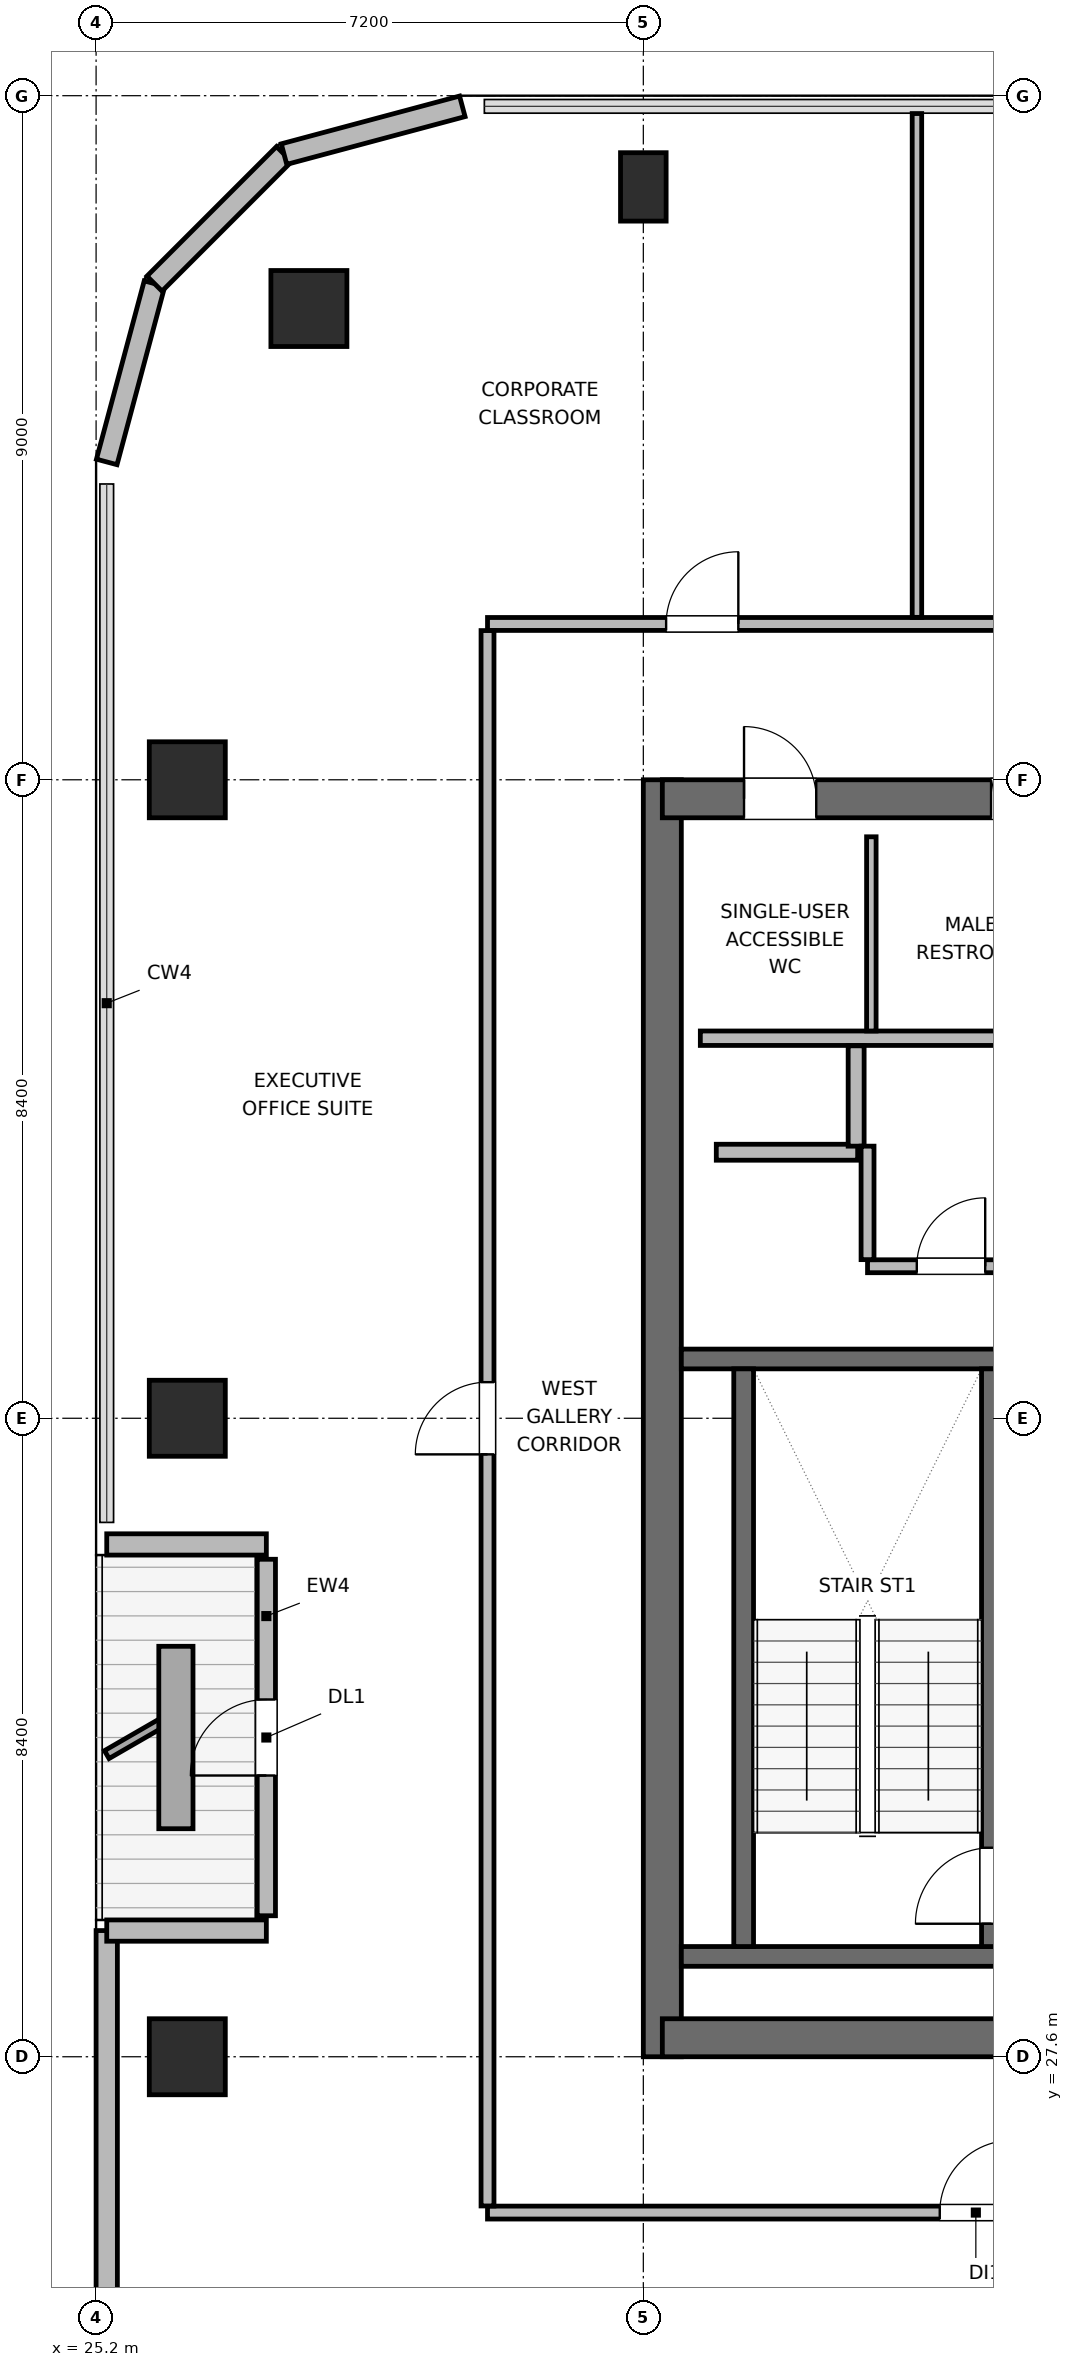
"""IFC4 building model, lengths in metres.
Left out: names, types, materials, properties, quantities, classifications, styles, units other than length and angle.
Written with IfcOpenShell. Run it as: python <this file> out.ifc"""

import sys

from ifc_helpers import new_model, si_unit, direction, frame, frame_2d, origin, origin_2d, place, context, subcontext, project, spatial, rectangle, circle, extrude, element, fill, save


model = new_model("IFC4")
c1 = context("Model", 3, precision=1e-05, world=origin(), true_north=direction((0.0, 1.0)))
c2 = subcontext(c1, "Body", "Model", "MODEL_VIEW")
j1 = project(units=[si_unit("LENGTHUNIT", "METRE"), si_unit("PLANEANGLEUNIT", "RADIAN")], contexts=[c1])
p1 = place(None, origin())
s1 = spatial("IfcSite", under=j1, at=p1, CompositionType="ELEMENT")
p2 = place(p1, origin())
s2 = spatial("IfcBuilding", under=s1, at=p2, CompositionType="ELEMENT")
p3 = place(p2, frame((0.0, 0.0, 274.5)))
s3 = spatial("IfcBuildingStorey", under=s2, at=p3, CompositionType="ELEMENT", Elevation=274.5)
p4 = place(p3, frame((32.65, 27.6, 0.0), z_axis=(0.0, 0.0, 1.0), x_axis=(0.0, 1.0, 0.0)))
e1 = element("IfcWall", 1, at=p4, inside=s3, PredefinedType="SHEAR", context=c2, shape_type="SweptSolid", body=[
    extrude(rectangle(XDim=16.8, YDim=0.5, at=frame_2d((8.4, 0.0))), origin(), (0.0, 0.0, 1.0), 3.9),
])
p5 = place(p3, frame((32.65, 27.85, 0.0), z_axis=(0.0, 0.0, 1.0), x_axis=(1.0, 0.0, 0.0)))
e2 = element("IfcWall", 2, at=p5, inside=s3, PredefinedType="SHEAR", context=c2, shape_type="SweptSolid", body=[
    extrude(rectangle(XDim=9.5, YDim=0.5, at=frame_2d((4.75, 0.0))), origin(), (0.0, 0.0, 1.0), 3.9),
])
p6 = place(p5, frame((5.075, 0.0, 0.0)))
e3 = element("IfcOpeningElement", 3, at=p6, cuts=e2, PredefinedType="OPENING", context=c2, shape_type="SweptSolid", body=[
    extrude(rectangle(XDim=1.05, YDim=2.04, at=frame_2d((0.525, 1.02))), frame((0.0, 0.26, 0.0), z_axis=(0.0, -1.0, 0.0), x_axis=(1.0, 0.0, 0.0)), (0.0, 0.0, 1.0), 0.52),
])
p7 = place(p3, frame((32.65, 44.15, 0.0), z_axis=(0.0, 0.0, 1.0), x_axis=(1.0, 0.0, 0.0)))
e4 = element("IfcWall", 4, at=p7, inside=s3, PredefinedType="SHEAR", context=c2, shape_type="SweptSolid", body=[
    extrude(rectangle(XDim=9.5, YDim=0.5, at=frame_2d((4.75, 0.0))), origin(), (0.0, 0.0, 1.0), 3.9),
])
p8 = place(p7, frame((1.075, 0.0, 0.0)))
e5 = element("IfcOpeningElement", 5, at=p8, cuts=e4, PredefinedType="OPENING", context=c2, shape_type="SweptSolid", body=[
    extrude(rectangle(XDim=0.95, YDim=2.04, at=frame_2d((0.475, 1.02))), frame((0.0, 0.26, 0.0), z_axis=(0.0, -1.0, 0.0), x_axis=(1.0, 0.0, 0.0)), (0.0, 0.0, 1.0), 0.52),
])
p9 = place(p7, frame((4.325, 0.0, 0.0)))
e6 = element("IfcOpeningElement", 6, at=p9, cuts=e4, PredefinedType="OPENING", context=c2, shape_type="SweptSolid", body=[
    extrude(rectangle(XDim=0.9, YDim=2.02, at=frame_2d((0.45, 1.01))), frame((0.0, 0.26, 0.0), z_axis=(0.0, -1.0, 0.0), x_axis=(1.0, 0.0, 0.0)), (0.0, 0.0, 1.0), 0.52),
])
p10 = place(p7, frame((7.225, 0.0, 0.0)))
e7 = element("IfcOpeningElement", 7, at=p10, cuts=e4, PredefinedType="OPENING", context=c2, shape_type="SweptSolid", body=[
    extrude(rectangle(XDim=0.9, YDim=2.02, at=frame_2d((0.45, 1.01))), frame((0.0, 0.26, 0.0), z_axis=(0.0, -1.0, 0.0), x_axis=(1.0, 0.0, 0.0)), (0.0, 0.0, 1.0), 0.52),
])
for number, where, z_axis, x_axis in (
    (8, (32.9, 28.92, 0.0), (0.0, 0.0, 1.0), (1.0, 0.0, 0.0)),
    (9, (32.9, 36.78, 0.0), (0.0, 0.0, 1.0), (1.0, 0.0, 0.0)),
):
    element("IfcWall", number, at=place(p3, frame(where, z_axis=z_axis, x_axis=x_axis)), inside=s3, PredefinedType="SHEAR", context=c2, shape_type="SweptSolid", body=[
        extrude(rectangle(XDim=4.21, YDim=0.26, at=frame_2d((2.105, 0.0))), origin(), (0.0, 0.0, 1.0), 3.9),
    ])
p11 = place(p3, frame((33.72, 29.05, 0.0), z_axis=(0.0, 0.0, 1.0), x_axis=(0.0, 1.0, 0.0)))
e10 = element("IfcWall", 10, at=p11, inside=s3, PredefinedType="SHEAR", context=c2, shape_type="SweptSolid", body=[
    extrude(rectangle(XDim=7.6, YDim=0.26, at=frame_2d((3.8, 0.0))), origin(), (0.0, 0.0, 1.0), 3.9),
])
p12 = place(p3, frame((36.98, 29.05, 0.0), z_axis=(0.0, 0.0, 1.0), x_axis=(0.0, 1.0, 0.0)))
e11 = element("IfcWall", 11, at=p12, inside=s3, PredefinedType="SHEAR", context=c2, shape_type="SweptSolid", body=[
    extrude(rectangle(XDim=7.6, YDim=0.26, at=frame_2d((3.8, 0.0))), origin(), (0.0, 0.0, 1.0), 3.9),
])
p13 = place(p12, frame((0.3, 0.0, 0.0)))
e12 = element("IfcOpeningElement", 12, at=p13, cuts=e11, PredefinedType="OPENING", context=c2, shape_type="SweptSolid", body=[
    extrude(rectangle(XDim=1.0, YDim=2.04, at=frame_2d((0.5, 1.02))), frame((0.0, 0.14, 0.0), z_axis=(0.0, -1.0, 0.0), x_axis=(1.0, 0.0, 0.0)), (0.0, 0.0, 1.0), 0.28),
])
p14 = place(p3, frame((28.0, 50.6, 0.0), z_axis=(0.0, 0.0, 1.0), x_axis=(1.0, 0.0, 0.0)))
e13 = element("IfcColumn", 13, at=p14, inside=s3, PredefinedType="COLUMN", context=c2, shape_type="SweptSolid", body=[
    extrude(circle(Radius=0.5, at=origin_2d()), origin(), (0.0, 0.0, 1.0), 3.9),
])
p15 = place(p3, frame((32.4, 52.2, 0.0), z_axis=(0.0, 0.0, 1.0), x_axis=(1.0, 0.0, 0.0)))
e14 = element("IfcColumn", 14, at=p15, inside=s3, PredefinedType="COLUMN", context=c2, shape_type="SweptSolid", body=[
    extrude(rectangle(XDim=0.6, YDim=0.9, at=origin_2d()), origin(), (0.0, 0.0, 1.0), 3.9),
])
for number, where, z_axis, x_axis in (
    (15, (26.4, 27.6, 0.0), (0.0, 0.0, 1.0), (1.0, 0.0, 0.0)),
    (16, (26.4, 36.0, 0.0), (0.0, 0.0, 1.0), (1.0, 0.0, 0.0)),
    (17, (26.4, 44.4, 0.0), (0.0, 0.0, 1.0), (1.0, 0.0, 0.0)),
):
    element("IfcColumn", number, at=place(p3, frame(where, z_axis=z_axis, x_axis=x_axis)), inside=s3, PredefinedType="COLUMN", context=c2, shape_type="SweptSolid", body=[
        extrude(rectangle(XDim=1.0, YDim=1.0, at=origin_2d()), origin(), (0.0, 0.0, 1.0), 3.9),
    ])
p16 = place(p3, frame((25.34, 23.418, 0.0), z_axis=(0.0, 0.0, 1.0), x_axis=(0.0, 1.0, 0.0)))
e18 = element("IfcWall", 18, at=p16, inside=s3, PredefinedType="SOLIDWALL", context=c2, shape_type="SweptSolid", body=[
    extrude(rectangle(XDim=5.842, YDim=0.28, at=frame_2d((2.921, 0.0))), origin(), (0.0, 0.0, 1.0), 3.68),
])
p17 = place(p3, frame((25.34, 29.26, 0.0), z_axis=(0.0, 0.0, 1.0), x_axis=(1.0, 0.0, 0.0)))
e19 = element("IfcWall", 19, at=p17, inside=s3, PredefinedType="SOLIDWALL", context=c2, shape_type="SweptSolid", body=[
    extrude(rectangle(XDim=2.1, YDim=0.28, at=frame_2d((1.05, 0.0))), origin(), (0.0, 0.0, 1.0), 3.126),
])
p18 = place(p3, frame((27.44, 29.455, 0.0), z_axis=(0.0, 0.0, 1.0), x_axis=(0.0, 1.0, 0.0)))
e20 = element("IfcWall", 20, at=p18, inside=s3, PredefinedType="SOLIDWALL", context=c2, shape_type="SweptSolid", body=[
    extrude(rectangle(XDim=4.69, YDim=0.24, at=frame_2d((2.345, 0.0))), origin(), (0.0, 0.0, 1.0), 3.311),
])
p19 = place(p18, frame((1.845, 0.0, 0.0)))
e21 = element("IfcOpeningElement", 21, at=p19, cuts=e20, PredefinedType="OPENING", context=c2, shape_type="SweptSolid", body=[
    extrude(rectangle(XDim=1.0, YDim=2.02, at=frame_2d((0.5, 1.01))), frame((0.0, 0.13, 0.0), z_axis=(0.0, -1.0, 0.0), x_axis=(1.0, 0.0, 0.0)), (0.0, 0.0, 1.0), 0.26),
])
p20 = place(p3, frame((27.44, 34.34, 0.0), z_axis=(0.0, 0.0, 1.0), x_axis=(-1.0, 0.0, 0.0)))
e22 = element("IfcWall", 22, at=p20, inside=s3, PredefinedType="SOLIDWALL", context=c2, shape_type="SweptSolid", body=[
    extrude(rectangle(XDim=2.1, YDim=0.28, at=frame_2d((1.05, 0.0))), origin(), (0.0, 0.0, 1.0), 3.126),
])
p21 = place(p3, frame((25.34, 48.582, 0.0), z_axis=(0.0, 0.0, 1.0), x_axis=(0.258751159445, 0.965944013639, 0.0)))
e23 = element("IfcWall", 23, at=p21, inside=s3, PredefinedType="SOLIDWALL", context=c2, shape_type="SweptSolid", body=[
    extrude(rectangle(XDim=2.429, YDim=0.28, at=frame_2d((1.214, 0.0))), origin(), (0.0, 0.0, 1.0), 3.68),
])
p22 = place(p3, frame((25.969, 50.927, 0.0), z_axis=(0.0, 0.0, 1.0), x_axis=(0.707106781187, 0.707106781187, 0.0)))
e24 = element("IfcWall", 24, at=p22, inside=s3, PredefinedType="SOLIDWALL", context=c2, shape_type="SweptSolid", body=[
    extrude(rectangle(XDim=2.41, YDim=0.28, at=frame_2d((1.205, 0.0))), origin(), (0.0, 0.0, 1.0), 3.68),
])
p23 = place(p3, frame((27.673, 52.632, 0.0), z_axis=(0.0, 0.0, 1.0), x_axis=(0.965937282298, 0.25877628691, 0.0)))
e25 = element("IfcWall", 25, at=p23, inside=s3, PredefinedType="SOLIDWALL", context=c2, shape_type="SweptSolid", body=[
    extrude(rectangle(XDim=2.428, YDim=0.28, at=frame_2d((1.214, 0.0))), origin(), (0.0, 0.0, 1.0), 3.68),
])
p24 = place(p3, frame((33.15, 41.0, 0.0), z_axis=(0.0, 0.0, 1.0), x_axis=(1.0, 0.0, 0.0)))
e26 = element("IfcWall", 26, at=p24, inside=s3, PredefinedType="PLUMBINGWALL", context=c2, shape_type="SweptSolid", body=[
    extrude(rectangle(XDim=8.5, YDim=0.19, at=frame_2d((4.25, 0.0))), origin(), (0.0, 0.0, 1.0), 3.68),
])
p25 = place(p3, frame((35.4, 41.095, 0.0), z_axis=(0.0, 0.0, 1.0), x_axis=(0.0, 1.0, 0.0)))
e27 = element("IfcWall", 27, at=p25, inside=s3, PredefinedType="PARTITIONING", context=c2, shape_type="SweptSolid", body=[
    extrude(rectangle(XDim=2.555, YDim=0.125, at=frame_2d((1.277, 0.0))), origin(), (0.0, 0.0, 1.0), 3.68),
])
p26 = place(p3, frame((33.36, 39.5, 0.0), z_axis=(0.0, 0.0, 1.0), x_axis=(1.0, 0.0, 0.0)))
e28 = element("IfcWall", 28, at=p26, inside=s3, PredefinedType="PARTITIONING", context=c2, shape_type="SweptSolid", body=[
    extrude(rectangle(XDim=1.86, YDim=0.21, at=frame_2d((0.93, 0.0))), origin(), (0.0, 0.0, 1.0), 3.68),
])
p27 = place(p3, frame((35.2, 39.58, 0.0), z_axis=(0.0, 0.0, 1.0), x_axis=(0.0, 1.0, 0.0)))
e29 = element("IfcWall", 29, at=p27, inside=s3, PredefinedType="PARTITIONING", context=c2, shape_type="SweptSolid", body=[
    extrude(rectangle(XDim=1.32, YDim=0.21, at=frame_2d((0.66, 0.0))), origin(), (0.0, 0.0, 1.0), 3.68),
])
p28 = place(p3, frame((35.35, 38.0, 0.0), z_axis=(0.0, 0.0, 1.0), x_axis=(1.0, 0.0, 0.0)))
e30 = element("IfcWall", 30, at=p28, inside=s3, PredefinedType="PARTITIONING", context=c2, shape_type="SweptSolid", body=[
    extrude(rectangle(XDim=6.1, YDim=0.17, at=frame_2d((3.05, 0.0))), origin(), (0.0, 0.0, 1.0), 3.68),
])
p29 = place(p28, frame((0.648, 0.0, 0.0)))
e31 = element("IfcOpeningElement", 31, at=p29, cuts=e30, PredefinedType="OPENING", context=c2, shape_type="SweptSolid", body=[
    extrude(rectangle(XDim=0.9, YDim=2.02, at=frame_2d((0.45, 1.01))), frame((0.0, 0.095, 0.0), z_axis=(0.0, -1.0, 0.0), x_axis=(1.0, 0.0, 0.0)), (0.0, 0.0, 1.0), 0.19),
])
p30 = place(p28, frame((3.698, 0.0, 0.0)))
e32 = element("IfcOpeningElement", 32, at=p30, cuts=e30, PredefinedType="OPENING", context=c2, shape_type="SweptSolid", body=[
    extrude(rectangle(XDim=0.9, YDim=2.02, at=frame_2d((0.45, 1.01))), frame((0.0, 0.095, 0.0), z_axis=(0.0, -1.0, 0.0), x_axis=(1.0, 0.0, 0.0)), (0.0, 0.0, 1.0), 0.19),
])
p31 = place(p3, frame((35.35, 38.087, 0.0), z_axis=(0.0, 0.0, 1.0), x_axis=(0.0, 1.0, 0.0)))
e33 = element("IfcWall", 33, at=p31, inside=s3, PredefinedType="PARTITIONING", context=c2, shape_type="SweptSolid", body=[
    extrude(rectangle(XDim=1.493, YDim=0.17, at=frame_2d((0.747, 0.0))), origin(), (0.0, 0.0, 1.0), 3.68),
])
p32 = place(p3, frame((30.35, 25.55, 0.0), z_axis=(0.0, 0.0, 1.0), x_axis=(1.0, 0.0, 0.0)))
e34 = element("IfcWall", 34, at=p32, inside=s3, PredefinedType="PARTITIONING", context=c2, shape_type="SweptSolid", body=[
    extrude(rectangle(XDim=33.25, YDim=0.17, at=frame_2d((16.625, 0.0))), origin(), (0.0, 0.0, 1.0), 3.68),
])
p33 = place(p32, frame((5.95, 0.0, 0.0)))
e35 = element("IfcOpeningElement", 35, at=p33, cuts=e34, PredefinedType="OPENING", context=c2, shape_type="SweptSolid", body=[
    extrude(rectangle(XDim=0.95, YDim=2.04, at=frame_2d((0.475, 1.02))), frame((0.0, 0.095, 0.0), z_axis=(0.0, -1.0, 0.0), x_axis=(1.0, 0.0, 0.0)), (0.0, 0.0, 1.0), 0.19),
])
p34 = place(p32, frame((22.575, 0.0, 0.0)))
e36 = element("IfcOpeningElement", 36, at=p34, cuts=e34, PredefinedType="OPENING", context=c2, shape_type="SweptSolid", body=[
    extrude(rectangle(XDim=0.95, YDim=2.04, at=frame_2d((0.475, 1.02))), frame((0.0, 0.095, 0.0), z_axis=(0.0, -1.0, 0.0), x_axis=(1.0, 0.0, 0.0)), (0.0, 0.0, 1.0), 0.19),
])
p35 = place(p3, frame((30.35, 46.45, 0.0), z_axis=(0.0, 0.0, 1.0), x_axis=(1.0, 0.0, 0.0)))
e37 = element("IfcWall", 37, at=p35, inside=s3, PredefinedType="PARTITIONING", context=c2, shape_type="SweptSolid", body=[
    extrude(rectangle(XDim=33.25, YDim=0.17, at=frame_2d((16.625, 0.0))), origin(), (0.0, 0.0, 1.0), 3.68),
])
p36 = place(p35, frame((2.35, 0.0, 0.0)))
e38 = element("IfcOpeningElement", 38, at=p36, cuts=e37, PredefinedType="OPENING", context=c2, shape_type="SweptSolid", body=[
    extrude(rectangle(XDim=0.95, YDim=2.04, at=frame_2d((0.475, 1.02))), frame((0.0, 0.095, 0.0), z_axis=(0.0, -1.0, 0.0), x_axis=(1.0, 0.0, 0.0)), (0.0, 0.0, 1.0), 0.19),
])
p37 = place(p35, frame((7.275, 0.0, 0.0)))
e39 = element("IfcOpeningElement", 39, at=p37, cuts=e37, PredefinedType="OPENING", context=c2, shape_type="SweptSolid", body=[
    extrude(rectangle(XDim=0.95, YDim=2.04, at=frame_2d((0.475, 1.02))), frame((0.0, 0.095, 0.0), z_axis=(0.0, -1.0, 0.0), x_axis=(1.0, 0.0, 0.0)), (0.0, 0.0, 1.0), 0.19),
])
p38 = place(p35, frame((12.475, 0.0, 0.0)))
e40 = element("IfcOpeningElement", 40, at=p38, cuts=e37, PredefinedType="OPENING", context=c2, shape_type="SweptSolid", body=[
    extrude(rectangle(XDim=0.95, YDim=2.04, at=frame_2d((0.475, 1.02))), frame((0.0, 0.095, 0.0), z_axis=(0.0, -1.0, 0.0), x_axis=(1.0, 0.0, 0.0)), (0.0, 0.0, 1.0), 0.19),
])
p39 = place(p35, frame((18.175, 0.0, 0.0)))
e41 = element("IfcOpeningElement", 41, at=p39, cuts=e37, PredefinedType="OPENING", context=c2, shape_type="SweptSolid", body=[
    extrude(rectangle(XDim=0.95, YDim=2.04, at=frame_2d((0.475, 1.02))), frame((0.0, 0.095, 0.0), z_axis=(0.0, -1.0, 0.0), x_axis=(1.0, 0.0, 0.0)), (0.0, 0.0, 1.0), 0.19),
])
p40 = place(p35, frame((23.175, 0.0, 0.0)))
e42 = element("IfcOpeningElement", 42, at=p40, cuts=e37, PredefinedType="OPENING", context=c2, shape_type="SweptSolid", body=[
    extrude(rectangle(XDim=0.95, YDim=2.04, at=frame_2d((0.475, 1.02))), frame((0.0, 0.095, 0.0), z_axis=(0.0, -1.0, 0.0), x_axis=(1.0, 0.0, 0.0)), (0.0, 0.0, 1.0), 0.19),
])
p41 = place(p35, frame((27.675, 0.0, 0.0)))
e43 = element("IfcOpeningElement", 43, at=p41, cuts=e37, PredefinedType="OPENING", context=c2, shape_type="SweptSolid", body=[
    extrude(rectangle(XDim=0.95, YDim=2.04, at=frame_2d((0.475, 1.02))), frame((0.0, 0.095, 0.0), z_axis=(0.0, -1.0, 0.0), x_axis=(1.0, 0.0, 0.0)), (0.0, 0.0, 1.0), 0.19),
])
p42 = place(p35, frame((31.275, 0.0, 0.0)))
e44 = element("IfcOpeningElement", 44, at=p42, cuts=e37, PredefinedType="OPENING", context=c2, shape_type="SweptSolid", body=[
    extrude(rectangle(XDim=0.95, YDim=2.04, at=frame_2d((0.475, 1.02))), frame((0.0, 0.095, 0.0), z_axis=(0.0, -1.0, 0.0), x_axis=(1.0, 0.0, 0.0)), (0.0, 0.0, 1.0), 0.19),
])
p43 = place(p3, frame((30.35, 25.637, 0.0), z_axis=(0.0, 0.0, 1.0), x_axis=(0.0, 1.0, 0.0)))
e45 = element("IfcWall", 45, at=p43, inside=s3, PredefinedType="PARTITIONING", context=c2, shape_type="SweptSolid", body=[
    extrude(rectangle(XDim=20.726, YDim=0.17, at=frame_2d((10.363, 0.0))), origin(), (0.0, 0.0, 1.0), 3.68),
])
p44 = place(p43, frame((9.888, 0.0, 0.0)))
e46 = element("IfcOpeningElement", 46, at=p44, cuts=e45, PredefinedType="OPENING", context=c2, shape_type="SweptSolid", body=[
    extrude(rectangle(XDim=0.95, YDim=2.04, at=frame_2d((0.475, 1.02))), frame((0.0, 0.095, 0.0), z_axis=(0.0, -1.0, 0.0), x_axis=(1.0, 0.0, 0.0)), (0.0, 0.0, 1.0), 0.19),
])
p45 = place(p3, frame((36.0, 46.537, 0.0), z_axis=(0.0, 0.0, 1.0), x_axis=(0.0, 1.0, 0.0)))
e47 = element("IfcWall", 47, at=p45, inside=s3, PredefinedType="PARTITIONING", context=c2, shape_type="SweptSolid", body=[
    extrude(rectangle(XDim=6.628, YDim=0.125, at=frame_2d((3.314, 0.0))), origin(), (0.0, 0.0, 1.0), 3.68),
])
p46 = place(p19, origin())
e48 = element("IfcDoor", 48, at=p46, inside=s3, OperationType="SINGLE_SWING_LEFT", PredefinedType="DOOR", context=c2, shape_type="SweptSolid", body=[
    extrude(rectangle(XDim=1.0, YDim=2.02, at=frame_2d((0.5, 1.01))), frame((0.0, 0.025, 0.0), z_axis=(0.0, -1.0, 0.0), x_axis=(1.0, 0.0, 0.0)), (0.0, 0.0, 1.0), 0.05),
])
fill(e21, e48)
p47 = place(p13, origin())
e49 = element("IfcDoor", 49, at=p47, inside=s3, OperationType="SINGLE_SWING_LEFT", PredefinedType="DOOR", context=c2, shape_type="SweptSolid", body=[
    extrude(rectangle(XDim=1.0, YDim=2.04, at=frame_2d((0.5, 1.02))), frame((0.0, 0.025, 0.0), z_axis=(0.0, -1.0, 0.0), x_axis=(1.0, 0.0, 0.0)), (0.0, 0.0, 1.0), 0.05),
])
fill(e12, e49)
p48 = place(p8, origin())
e50 = element("IfcDoor", 50, at=p48, inside=s3, OperationType="SINGLE_SWING_LEFT", PredefinedType="DOOR", context=c2, shape_type="SweptSolid", body=[
    extrude(rectangle(XDim=0.95, YDim=2.04, at=frame_2d((0.475, 1.02))), frame((0.0, 0.025, 0.0), z_axis=(0.0, -1.0, 0.0), x_axis=(1.0, 0.0, 0.0)), (0.0, 0.0, 1.0), 0.05),
])
fill(e5, e50)
p49 = place(p9, origin())
e51 = element("IfcDoor", 51, at=p49, inside=s3, OperationType="SINGLE_SWING_RIGHT", PredefinedType="DOOR", context=c2, shape_type="SweptSolid", body=[
    extrude(rectangle(XDim=0.9, YDim=2.02, at=frame_2d((0.45, 1.01))), frame((0.0, 0.025, 0.0), z_axis=(0.0, -1.0, 0.0), x_axis=(1.0, 0.0, 0.0)), (0.0, 0.0, 1.0), 0.05),
])
fill(e6, e51)
p50 = place(p29, origin())
e52 = element("IfcDoor", 52, at=p50, inside=s3, OperationType="SINGLE_SWING_RIGHT", PredefinedType="DOOR", context=c2, shape_type="SweptSolid", body=[
    extrude(rectangle(XDim=0.9, YDim=2.02, at=frame_2d((0.45, 1.01))), frame((0.0, 0.025, 0.0), z_axis=(0.0, -1.0, 0.0), x_axis=(1.0, 0.0, 0.0)), (0.0, 0.0, 1.0), 0.05),
])
fill(e31, e52)
p51 = place(p33, origin())
e53 = element("IfcDoor", 53, at=p51, inside=s3, OperationType="SINGLE_SWING_RIGHT", PredefinedType="DOOR", context=c2, shape_type="SweptSolid", body=[
    extrude(rectangle(XDim=0.95, YDim=2.04, at=frame_2d((0.475, 1.02))), frame((0.0, 0.025, 0.0), z_axis=(0.0, -1.0, 0.0), x_axis=(1.0, 0.0, 0.0)), (0.0, 0.0, 1.0), 0.05),
])
fill(e35, e53)
p52 = place(p36, origin())
e54 = element("IfcDoor", 54, at=p52, inside=s3, OperationType="SINGLE_SWING_RIGHT", PredefinedType="DOOR", context=c2, shape_type="SweptSolid", body=[
    extrude(rectangle(XDim=0.95, YDim=2.04, at=frame_2d((0.475, 1.02))), frame((0.0, 0.025, 0.0), z_axis=(0.0, -1.0, 0.0), x_axis=(1.0, 0.0, 0.0)), (0.0, 0.0, 1.0), 0.05),
])
fill(e38, e54)
p53 = place(p44, origin())
e55 = element("IfcDoor", 55, at=p53, inside=s3, OperationType="SINGLE_SWING_LEFT", PredefinedType="DOOR", context=c2, shape_type="SweptSolid", body=[
    extrude(rectangle(XDim=0.95, YDim=2.04, at=frame_2d((0.475, 1.02))), frame((0.0, 0.025, 0.0), z_axis=(0.0, -1.0, 0.0), x_axis=(1.0, 0.0, 0.0)), (0.0, 0.0, 1.0), 0.05),
])
fill(e46, e55)
save(model, sys.argv[1])
